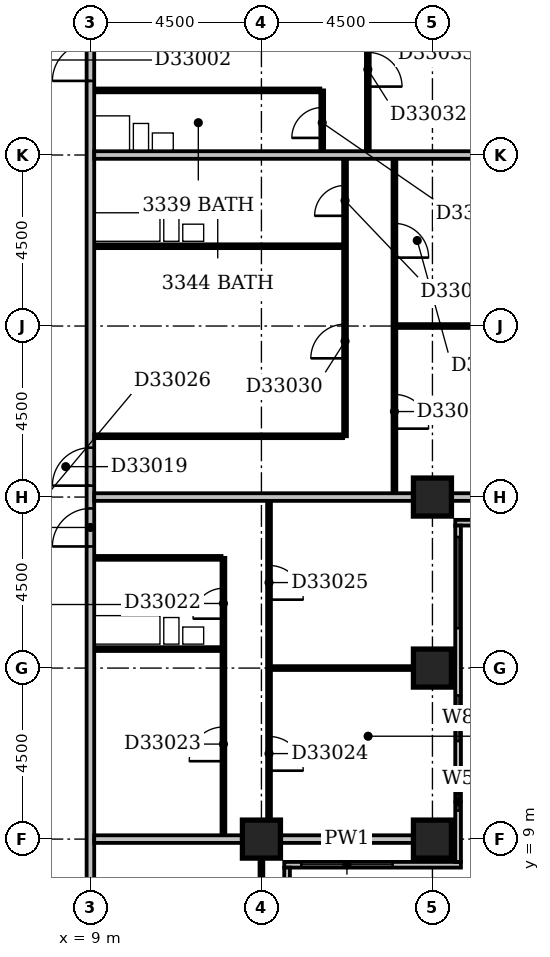
"""IFC4 building model, lengths in metres.
Left out: names, types, materials, properties, quantities, classifications, styles, units other than length and angle.
Written with IfcOpenShell. Run it as: python <this file> out.ifc"""

import sys

from ifc_helpers import new_model, si_unit, direction, frame, frame_2d, origin, origin_2d, place, context, subcontext, project, spatial, rectangle, extrude, element, fill, save


model = new_model("IFC4")
c1 = context("Model", 3, precision=1e-05, world=origin(), true_north=direction((0.0, 1.0)))
c2 = subcontext(c1, "Body", "Model", "MODEL_VIEW")
j1 = project(units=[si_unit("LENGTHUNIT", "METRE"), si_unit("PLANEANGLEUNIT", "RADIAN")], contexts=[c1])
p1 = place(None, origin())
s1 = spatial("IfcSite", under=j1, at=p1, CompositionType="ELEMENT")
p2 = place(p1, origin())
s2 = spatial("IfcBuilding", under=s1, at=p2, CompositionType="ELEMENT")
p3 = place(p2, frame((0.0, 0.0, 134.0)))
s3 = spatial("IfcBuildingStorey", under=s2, at=p3, CompositionType="ELEMENT", Elevation=134.0)
for number, where, z_axis, x_axis in (
    (1, (13.5, 9.0, -0.3), (0.0, 0.0, 1.0), (1.0, 0.0, 0.0)),
    (2, (18.0, 9.0, -0.3), (0.0, 0.0, 1.0), (1.0, 0.0, 0.0)),
    (3, (18.0, 13.5, -0.3), (0.0, 0.0, 1.0), (1.0, 0.0, 0.0)),
    (4, (18.0, 18.0, -0.3), (0.0, 0.0, 1.0), (1.0, 0.0, 0.0)),
):
    element("IfcColumn", number, at=place(p3, frame(where, z_axis=z_axis, x_axis=x_axis)), inside=s3, PredefinedType="COLUMN", context=c2, shape_type="SweptSolid", body=[
        extrude(rectangle(XDim=1.0, YDim=1.0, at=origin_2d()), origin(), (0.0, 0.0, 1.0), 3.6),
    ])
p4 = place(p3, frame((14.175, 3.9, 0.0), z_axis=(0.0, 0.0, 1.0), x_axis=(0.0, 1.0, 0.0)))
e5 = element("IfcWall", 5, at=p4, inside=s3, PredefinedType="STANDARD", context=c2, shape_type="SweptSolid", body=[
    extrude(rectangle(XDim=4.35, YDim=0.15, at=frame_2d((2.175, 0.0))), origin(), (0.0, 0.0, 1.0), 2.7),
])
p5 = place(p4, frame((1.65, 0.0, 0.6)))
e6 = element("IfcOpeningElement", 6, at=p5, cuts=e5, PredefinedType="OPENING", context=c2, shape_type="SweptSolid", body=[
    extrude(rectangle(XDim=2.4, YDim=1.8, at=frame_2d((1.2, 0.9))), frame((0.0, 0.087, 0.0), z_axis=(0.0, -1.0, 0.0), x_axis=(1.0, 0.0, 0.0)), (0.0, 0.0, 1.0), 0.174),
])
p6 = place(p3, frame((14.1, 8.325, 0.0), z_axis=(0.0, 0.0, 1.0), x_axis=(1.0, 0.0, 0.0)))
e7 = element("IfcWall", 7, at=p6, inside=s3, PredefinedType="STANDARD", context=c2, shape_type="SweptSolid", body=[
    extrude(rectangle(XDim=4.65, YDim=0.15, at=frame_2d((2.325, 0.0))), origin(), (0.0, 0.0, 1.0), 2.7),
])
p7 = place(p6, frame((0.45, 0.0, 0.6)))
e8 = element("IfcOpeningElement", 8, at=p7, cuts=e7, PredefinedType="OPENING", context=c2, shape_type="SweptSolid", body=[
    extrude(rectangle(XDim=2.4, YDim=1.8, at=frame_2d((1.2, 0.9))), frame((0.0, 0.087, 0.0), z_axis=(0.0, -1.0, 0.0), x_axis=(1.0, 0.0, 0.0)), (0.0, 0.0, 1.0), 0.174),
])
p8 = place(p3, frame((18.675, 8.4, 0.0), z_axis=(0.0, 0.0, 1.0), x_axis=(0.0, 1.0, 0.0)))
e9 = element("IfcWall", 9, at=p8, inside=s3, PredefinedType="STANDARD", context=c2, shape_type="SweptSolid", body=[
    extrude(rectangle(XDim=8.85, YDim=0.15, at=frame_2d((4.425, 0.0))), origin(), (0.0, 0.0, 1.0), 2.7),
])
p9 = place(p8, frame((1.351, 0.0, 0.6)))
e10 = element("IfcOpeningElement", 10, at=p9, cuts=e9, PredefinedType="OPENING", context=c2, shape_type="SweptSolid", body=[
    extrude(rectangle(XDim=0.45, YDim=1.8, at=frame_2d((0.225, 0.9))), frame((0.0, 0.087, 0.0), z_axis=(0.0, -1.0, 0.0), x_axis=(1.0, 0.0, 0.0)), (0.0, 0.0, 1.0), 0.174),
])
p10 = place(p8, frame((3.179, 0.0, 0.6)))
e11 = element("IfcOpeningElement", 11, at=p10, cuts=e9, PredefinedType="OPENING", context=c2, shape_type="SweptSolid", body=[
    extrude(rectangle(XDim=1.2, YDim=1.8, at=frame_2d((0.6, 0.9))), frame((0.0, 0.087, 0.0), z_axis=(0.0, -1.0, 0.0), x_axis=(1.0, 0.0, 0.0)), (0.0, 0.0, 1.0), 0.174),
])
p11 = place(p8, frame((6.15, 0.0, 0.6)))
e12 = element("IfcOpeningElement", 12, at=p11, cuts=e9, PredefinedType="OPENING", context=c2, shape_type="SweptSolid", body=[
    extrude(rectangle(XDim=2.4, YDim=1.8, at=frame_2d((1.2, 0.9))), frame((0.0, 0.087, 0.0), z_axis=(0.0, -1.0, 0.0), x_axis=(1.0, 0.0, 0.0)), (0.0, 0.0, 1.0), 0.174),
])
p12 = place(p3, frame((18.6, 17.325, 0.0), z_axis=(0.0, 0.0, 1.0), x_axis=(1.0, 0.0, 0.0)))
e13 = element("IfcWall", 13, at=p12, inside=s3, PredefinedType="STANDARD", context=c2, shape_type="SweptSolid", body=[
    extrude(rectangle(XDim=4.65, YDim=0.15, at=frame_2d((2.325, 0.0))), origin(), (0.0, 0.0, 1.0), 2.7),
])
p13 = place(p12, frame((0.45, 0.0, 0.6)))
e14 = element("IfcOpeningElement", 14, at=p13, cuts=e13, PredefinedType="OPENING", context=c2, shape_type="SweptSolid", body=[
    extrude(rectangle(XDim=2.4, YDim=1.8, at=frame_2d((1.2, 0.9))), frame((0.0, 0.087, 0.0), z_axis=(0.0, -1.0, 0.0), x_axis=(1.0, 0.0, 0.0)), (0.0, 0.0, 1.0), 0.174),
])
p14 = place(p3, frame((9.0, 5.0, 0.0), z_axis=(0.0, 0.0, 1.0), x_axis=(0.0, 1.0, 0.0)))
e15 = element("IfcWall", 15, at=p14, inside=s3, PredefinedType="PARTITIONING", context=c2, shape_type="SweptSolid", body=[
    extrude(rectangle(XDim=27.75, YDim=0.2, at=frame_2d((13.875, 0.0))), origin(), (0.0, 0.0, 1.0), 3.3),
])
p15 = place(p14, frame((23.95, 0.0, 0.0)))
e16 = element("IfcOpeningElement", 16, at=p15, cuts=e15, PredefinedType="OPENING", context=c2, shape_type="SweptSolid", body=[
    extrude(rectangle(XDim=1.0, YDim=2.1, at=frame_2d((0.5, 1.05))), frame((0.0, 0.112, 0.0), z_axis=(0.0, -1.0, 0.0), x_axis=(1.0, 0.0, 0.0)), (0.0, 0.0, 1.0), 0.224),
])
p16 = place(p14, frame((13.3, 0.0, 0.0)))
e17 = element("IfcOpeningElement", 17, at=p16, cuts=e15, PredefinedType="OPENING", context=c2, shape_type="SweptSolid", body=[
    extrude(rectangle(XDim=1.0, YDim=2.1, at=frame_2d((0.5, 1.05))), frame((0.0, 0.112, 0.0), z_axis=(0.0, -1.0, 0.0), x_axis=(1.0, 0.0, 0.0)), (0.0, 0.0, 1.0), 0.224),
])
p17 = place(p14, frame((11.7, 0.0, 0.0)))
e18 = element("IfcOpeningElement", 18, at=p17, cuts=e15, PredefinedType="OPENING", context=c2, shape_type="SweptSolid", body=[
    extrude(rectangle(XDim=1.0, YDim=2.1, at=frame_2d((0.5, 1.05))), frame((0.0, 0.112, 0.0), z_axis=(0.0, -1.0, 0.0), x_axis=(1.0, 0.0, 0.0)), (0.0, 0.0, 1.0), 0.224),
])
p18 = place(p14, frame((1.5, 0.0, 0.0)))
e19 = element("IfcOpeningElement", 19, at=p18, cuts=e15, PredefinedType="OPENING", context=c2, shape_type="SweptSolid", body=[
    extrude(rectangle(XDim=0.9, YDim=2.1, at=frame_2d((0.45, 1.05))), frame((0.0, 0.112, 0.0), z_axis=(0.0, -1.0, 0.0), x_axis=(1.0, 0.0, 0.0)), (0.0, 0.0, 1.0), 0.224),
])
p19 = place(p3, frame((13.5, 5.0, 0.0), z_axis=(0.0, 0.0, 1.0), x_axis=(0.0, 1.0, 0.0)))
e20 = element("IfcWall", 20, at=p19, inside=s3, PredefinedType="PARTITIONING", context=c2, shape_type="SweptSolid", body=[
    extrude(rectangle(XDim=3.5, YDim=0.1, at=frame_2d((1.75, 0.0))), origin(), (0.0, 0.0, 1.0), 2.7),
])
p20 = place(p3, frame((9.1, 9.0, 0.0), z_axis=(0.0, 0.0, 1.0), x_axis=(1.0, 0.0, 0.0)))
e21 = element("IfcWall", 21, at=p20, inside=s3, PredefinedType="PARTITIONING", context=c2, shape_type="SweptSolid", body=[
    extrude(rectangle(XDim=3.9, YDim=0.2, at=frame_2d((1.95, 0.0))), origin(), (0.0, 0.0, 1.0), 3.3),
])
p21 = place(p3, frame((14.0, 9.0, 0.0), z_axis=(0.0, 0.0, 1.0), x_axis=(1.0, 0.0, 0.0)))
e22 = element("IfcWall", 22, at=p21, inside=s3, PredefinedType="PARTITIONING", context=c2, shape_type="SweptSolid", body=[
    extrude(rectangle(XDim=3.5, YDim=0.2, at=frame_2d((1.75, 0.0))), origin(), (0.0, 0.0, 1.0), 2.7),
])
p22 = place(p3, frame((12.5, 9.1, 0.0), z_axis=(0.0, 0.0, 1.0), x_axis=(0.0, 1.0, 0.0)))
e23 = element("IfcWall", 23, at=p22, inside=s3, PredefinedType="PARTITIONING", context=c2, shape_type="SweptSolid", body=[
    extrude(rectangle(XDim=7.3, YDim=0.1, at=frame_2d((3.65, 0.0))), origin(), (0.0, 0.0, 1.0), 3.3),
])
p23 = place(p22, frame((5.7, 0.0, 0.0)))
e24 = element("IfcOpeningElement", 24, at=p23, cuts=e23, PredefinedType="OPENING", context=c2, shape_type="SweptSolid", body=[
    extrude(rectangle(XDim=0.8, YDim=2.1, at=frame_2d((0.4, 1.05))), frame((0.0, 0.062, 0.0), z_axis=(0.0, -1.0, 0.0), x_axis=(1.0, 0.0, 0.0)), (0.0, 0.0, 1.0), 0.124),
])
p24 = place(p22, frame((1.95, 0.0, 0.0)))
e25 = element("IfcOpeningElement", 25, at=p24, cuts=e23, PredefinedType="OPENING", context=c2, shape_type="SweptSolid", body=[
    extrude(rectangle(XDim=0.9, YDim=2.1, at=frame_2d((0.45, 1.05))), frame((0.0, 0.062, 0.0), z_axis=(0.0, -1.0, 0.0), x_axis=(1.0, 0.0, 0.0)), (0.0, 0.0, 1.0), 0.124),
])
p25 = place(p3, frame((13.7, 9.5, 0.0), z_axis=(0.0, 0.0, 1.0), x_axis=(0.0, 1.0, 0.0)))
e26 = element("IfcWall", 26, at=p25, inside=s3, PredefinedType="PARTITIONING", context=c2, shape_type="SweptSolid", body=[
    extrude(rectangle(XDim=8.4, YDim=0.1, at=frame_2d((4.2, 0.0))), origin(), (0.0, 0.0, 1.0), 3.3),
])
p26 = place(p25, frame((1.3, 0.0, 0.0)))
e27 = element("IfcOpeningElement", 27, at=p26, cuts=e26, PredefinedType="OPENING", context=c2, shape_type="SweptSolid", body=[
    extrude(rectangle(XDim=0.9, YDim=2.1, at=frame_2d((0.45, 1.05))), frame((0.0, 0.062, 0.0), z_axis=(0.0, -1.0, 0.0), x_axis=(1.0, 0.0, 0.0)), (0.0, 0.0, 1.0), 0.124),
])
p27 = place(p25, frame((5.8, 0.0, 0.0)))
e28 = element("IfcOpeningElement", 28, at=p27, cuts=e26, PredefinedType="OPENING", context=c2, shape_type="SweptSolid", body=[
    extrude(rectangle(XDim=0.9, YDim=2.1, at=frame_2d((0.45, 1.05))), frame((0.0, 0.062, 0.0), z_axis=(0.0, -1.0, 0.0), x_axis=(1.0, 0.0, 0.0)), (0.0, 0.0, 1.0), 0.124),
])
p28 = place(p3, frame((13.75, 13.5, 0.0), z_axis=(0.0, 0.0, 1.0), x_axis=(1.0, 0.0, 0.0)))
e29 = element("IfcWall", 29, at=p28, inside=s3, PredefinedType="PARTITIONING", context=c2, shape_type="SweptSolid", body=[
    extrude(rectangle(XDim=3.75, YDim=0.1, at=frame_2d((1.875, 0.0))), origin(), (0.0, 0.0, 1.0), 3.3),
])
for number, where, z_axis, x_axis in (
    (30, (9.1, 14.0, 0.0), (0.0, 0.0, 1.0), (1.0, 0.0, 0.0)),
    (31, (9.1, 16.4, 0.0), (0.0, 0.0, 1.0), (1.0, 0.0, 0.0)),
):
    element("IfcWall", number, at=place(p3, frame(where, z_axis=z_axis, x_axis=x_axis)), inside=s3, PredefinedType="PLUMBINGWALL", context=c2, shape_type="SweptSolid", body=[
        extrude(rectangle(XDim=3.35, YDim=0.1, at=frame_2d((1.675, 0.0))), origin(), (0.0, 0.0, 1.0), 3.3),
    ])
p29 = place(p3, frame((9.1, 18.0, 0.0), z_axis=(0.0, 0.0, 1.0), x_axis=(1.0, 0.0, 0.0)))
e32 = element("IfcWall", 32, at=p29, inside=s3, PredefinedType="PARTITIONING", context=c2, shape_type="SweptSolid", body=[
    extrude(rectangle(XDim=8.4, YDim=0.2, at=frame_2d((4.2, 0.0))), origin(), (0.0, 0.0, 1.0), 2.6),
])
p30 = place(p3, frame((18.5, 18.0, 0.0), z_axis=(0.0, 0.0, 1.0), x_axis=(1.0, 0.0, 0.0)))
e33 = element("IfcWall", 33, at=p30, inside=s3, PredefinedType="PARTITIONING", context=c2, shape_type="SweptSolid", body=[
    extrude(rectangle(XDim=3.5, YDim=0.2, at=frame_2d((1.75, 0.0))), origin(), (0.0, 0.0, 1.0), 2.7),
])
p31 = place(p3, frame((17.0, 18.1, 0.0), z_axis=(0.0, 0.0, 1.0), x_axis=(0.0, 1.0, 0.0)))
e34 = element("IfcWall", 34, at=p31, inside=s3, PredefinedType="PARTITIONING", context=c2, shape_type="SweptSolid", body=[
    extrude(rectangle(XDim=8.8, YDim=0.1, at=frame_2d((4.4, 0.0))), origin(), (0.0, 0.0, 1.0), 3.3),
])
p32 = place(p31, frame((1.7, 0.0, 0.0)))
e35 = element("IfcOpeningElement", 35, at=p32, cuts=e34, PredefinedType="OPENING", context=c2, shape_type="SweptSolid", body=[
    extrude(rectangle(XDim=0.9, YDim=2.1, at=frame_2d((0.45, 1.05))), frame((0.0, 0.062, 0.0), z_axis=(0.0, -1.0, 0.0), x_axis=(1.0, 0.0, 0.0)), (0.0, 0.0, 1.0), 0.124),
])
p33 = place(p31, frame((6.2, 0.0, 0.0)))
e36 = element("IfcOpeningElement", 36, at=p33, cuts=e34, PredefinedType="OPENING", context=c2, shape_type="SweptSolid", body=[
    extrude(rectangle(XDim=0.9, YDim=2.1, at=frame_2d((0.45, 1.05))), frame((0.0, 0.062, 0.0), z_axis=(0.0, -1.0, 0.0), x_axis=(1.0, 0.0, 0.0)), (0.0, 0.0, 1.0), 0.124),
])
p34 = place(p3, frame((9.1, 19.6, 0.0), z_axis=(0.0, 0.0, 1.0), x_axis=(1.0, 0.0, 0.0)))
e37 = element("IfcWall", 37, at=p34, inside=s3, PredefinedType="PARTITIONING", context=c2, shape_type="SweptSolid", body=[
    extrude(rectangle(XDim=6.55, YDim=0.1, at=frame_2d((3.275, 0.0))), origin(), (0.0, 0.0, 1.0), 3.3),
])
p35 = place(p3, frame((15.7, 19.6, 0.0), z_axis=(0.0, 0.0, 1.0), x_axis=(0.0, 1.0, 0.0)))
e38 = element("IfcWall", 38, at=p35, inside=s3, PredefinedType="PARTITIONING", context=c2, shape_type="SweptSolid", body=[
    extrude(rectangle(XDim=7.3, YDim=0.1, at=frame_2d((3.65, 0.0))), origin(), (0.0, 0.0, 1.0), 3.3),
])
p36 = place(p35, frame((5.8, 0.0, 0.0)))
e39 = element("IfcOpeningElement", 39, at=p36, cuts=e38, PredefinedType="OPENING", context=c2, shape_type="SweptSolid", body=[
    extrude(rectangle(XDim=0.8, YDim=2.1, at=frame_2d((0.4, 1.05))), frame((0.0, 0.062, 0.0), z_axis=(0.0, -1.0, 0.0), x_axis=(1.0, 0.0, 0.0)), (0.0, 0.0, 1.0), 0.124),
])
p37 = place(p35, frame((2.05, 0.0, 0.0)))
e40 = element("IfcOpeningElement", 40, at=p37, cuts=e38, PredefinedType="OPENING", context=c2, shape_type="SweptSolid", body=[
    extrude(rectangle(XDim=0.9, YDim=2.1, at=frame_2d((0.45, 1.05))), frame((0.0, 0.062, 0.0), z_axis=(0.0, -1.0, 0.0), x_axis=(1.0, 0.0, 0.0)), (0.0, 0.0, 1.0), 0.124),
])
p38 = place(p3, frame((17.05, 22.5, 0.0), z_axis=(0.0, 0.0, 1.0), x_axis=(1.0, 0.0, 0.0)))
e41 = element("IfcWall", 41, at=p38, inside=s3, PredefinedType="PARTITIONING", context=c2, shape_type="SweptSolid", body=[
    extrude(rectangle(XDim=4.95, YDim=0.1, at=frame_2d((2.475, 0.0))), origin(), (0.0, 0.0, 1.0), 3.3),
])
p39 = place(p3, frame((9.1, 24.6, 0.0), z_axis=(0.0, 0.0, 1.0), x_axis=(1.0, 0.0, 0.0)))
e42 = element("IfcWall", 42, at=p39, inside=s3, PredefinedType="PLUMBINGWALL", context=c2, shape_type="SweptSolid", body=[
    extrude(rectangle(XDim=6.55, YDim=0.1, at=frame_2d((3.275, 0.0))), origin(), (0.0, 0.0, 1.0), 3.3),
])
p40 = place(p3, frame((9.1, 27.0, 0.0), z_axis=(0.0, 0.0, 1.0), x_axis=(1.0, 0.0, 0.0)))
e43 = element("IfcWall", 43, at=p40, inside=s3, PredefinedType="PARTITIONING", context=c2, shape_type="SweptSolid", body=[
    extrude(rectangle(XDim=12.9, YDim=0.2, at=frame_2d((6.45, 0.0))), origin(), (0.0, 0.0, 1.0), 2.7),
])
p41 = place(p3, frame((15.1, 27.1, 0.0), z_axis=(0.0, 0.0, 1.0), x_axis=(0.0, 1.0, 0.0)))
e44 = element("IfcWall", 44, at=p41, inside=s3, PredefinedType="PARTITIONING", context=c2, shape_type="SweptSolid", body=[
    extrude(rectangle(XDim=1.6, YDim=0.1, at=frame_2d((0.8, 0.0))), origin(), (0.0, 0.0, 1.0), 3.3),
])
p42 = place(p41, frame((0.35, 0.0, 0.0)))
e45 = element("IfcOpeningElement", 45, at=p42, cuts=e44, PredefinedType="OPENING", context=c2, shape_type="SweptSolid", body=[
    extrude(rectangle(XDim=0.8, YDim=2.1, at=frame_2d((0.4, 1.05))), frame((0.0, 0.062, 0.0), z_axis=(0.0, -1.0, 0.0), x_axis=(1.0, 0.0, 0.0)), (0.0, 0.0, 1.0), 0.124),
])
p43 = place(p3, frame((16.3, 27.1, 0.0), z_axis=(0.0, 0.0, 1.0), x_axis=(0.0, 1.0, 0.0)))
e46 = element("IfcWall", 46, at=p43, inside=s3, PredefinedType="PARTITIONING", context=c2, shape_type="SweptSolid", body=[
    extrude(rectangle(XDim=4.3, YDim=0.1, at=frame_2d((2.15, 0.0))), origin(), (0.0, 0.0, 1.0), 3.3),
])
p44 = place(p43, frame((1.7, 0.0, 0.0)))
e47 = element("IfcOpeningElement", 47, at=p44, cuts=e46, PredefinedType="OPENING", context=c2, shape_type="SweptSolid", body=[
    extrude(rectangle(XDim=0.9, YDim=2.1, at=frame_2d((0.45, 1.05))), frame((0.0, 0.062, 0.0), z_axis=(0.0, -1.0, 0.0), x_axis=(1.0, 0.0, 0.0)), (0.0, 0.0, 1.0), 0.124),
])
p45 = place(p3, frame((9.1, 28.7, 0.0), z_axis=(0.0, 0.0, 1.0), x_axis=(1.0, 0.0, 0.0)))
e48 = element("IfcWall", 48, at=p45, inside=s3, PredefinedType="PLUMBINGWALL", context=c2, shape_type="SweptSolid", body=[
    extrude(rectangle(XDim=5.95, YDim=0.1, at=frame_2d((2.975, 0.0))), origin(), (0.0, 0.0, 1.0), 3.3),
])
p46 = place(p7, origin())
e49 = element("IfcWindow", 49, at=p46, inside=s3, PartitioningType="SINGLE_PANEL", PredefinedType="WINDOW", context=c2, shape_type="SweptSolid", body=[
    extrude(rectangle(XDim=2.4, YDim=1.8, at=frame_2d((1.2, 0.9))), frame((0.0, 0.03, 0.0), z_axis=(0.0, -1.0, 0.0), x_axis=(1.0, 0.0, 0.0)), (0.0, 0.0, 1.0), 0.06),
])
fill(e8, e49)
p47 = place(p9, origin())
e50 = element("IfcWindow", 50, at=p47, inside=s3, PartitioningType="SINGLE_PANEL", PredefinedType="WINDOW", context=c2, shape_type="SweptSolid", body=[
    extrude(rectangle(XDim=0.45, YDim=1.8, at=frame_2d((0.225, 0.9))), frame((0.0, 0.03, 0.0), z_axis=(0.0, -1.0, 0.0), x_axis=(1.0, 0.0, 0.0)), (0.0, 0.0, 1.0), 0.06),
])
fill(e10, e50)
p48 = place(p10, origin())
e51 = element("IfcWindow", 51, at=p48, inside=s3, PartitioningType="SINGLE_PANEL", PredefinedType="WINDOW", context=c2, shape_type="SweptSolid", body=[
    extrude(rectangle(XDim=1.2, YDim=1.8, at=frame_2d((0.6, 0.9))), frame((0.0, 0.03, 0.0), z_axis=(0.0, -1.0, 0.0), x_axis=(1.0, 0.0, 0.0)), (0.0, 0.0, 1.0), 0.06),
])
fill(e11, e51)
p49 = place(p11, origin())
e52 = element("IfcWindow", 52, at=p49, inside=s3, PartitioningType="SINGLE_PANEL", PredefinedType="WINDOW", context=c2, shape_type="SweptSolid", body=[
    extrude(rectangle(XDim=2.4, YDim=1.8, at=frame_2d((1.2, 0.9))), frame((0.0, 0.03, 0.0), z_axis=(0.0, -1.0, 0.0), x_axis=(1.0, 0.0, 0.0)), (0.0, 0.0, 1.0), 0.06),
])
fill(e12, e52)
p50 = place(p15, origin())
e53 = element("IfcDoor", 53, at=p50, inside=s3, OperationType="SINGLE_SWING_LEFT", PredefinedType="DOOR", context=c2, shape_type="SweptSolid", body=[
    extrude(rectangle(XDim=1.0, YDim=2.1, at=frame_2d((0.5, 1.05))), frame((0.0, 0.025, 0.0), z_axis=(0.0, -1.0, 0.0), x_axis=(1.0, 0.0, 0.0)), (0.0, 0.0, 1.0), 0.05),
])
fill(e16, e53)
p51 = place(p16, origin())
e54 = element("IfcDoor", 54, at=p51, inside=s3, OperationType="SINGLE_SWING_LEFT", PredefinedType="DOOR", context=c2, shape_type="SweptSolid", body=[
    extrude(rectangle(XDim=1.0, YDim=2.1, at=frame_2d((0.5, 1.05))), frame((0.0, 0.025, 0.0), z_axis=(0.0, -1.0, 0.0), x_axis=(1.0, 0.0, 0.0)), (0.0, 0.0, 1.0), 0.05),
])
fill(e17, e54)
p52 = place(p17, origin())
e55 = element("IfcDoor", 55, at=p52, inside=s3, OperationType="SINGLE_SWING_LEFT", PredefinedType="DOOR", context=c2, shape_type="SweptSolid", body=[
    extrude(rectangle(XDim=1.0, YDim=2.1, at=frame_2d((0.5, 1.05))), frame((0.0, 0.025, 0.0), z_axis=(0.0, -1.0, 0.0), x_axis=(1.0, 0.0, 0.0)), (0.0, 0.0, 1.0), 0.05),
])
fill(e18, e55)
p53 = place(p23, origin())
e56 = element("IfcDoor", 56, at=p53, inside=s3, OperationType="SINGLE_SWING_LEFT", PredefinedType="DOOR", context=c2, shape_type="SweptSolid", body=[
    extrude(rectangle(XDim=0.8, YDim=2.1, at=frame_2d((0.4, 1.05))), frame((0.0, 0.025, 0.0), z_axis=(0.0, -1.0, 0.0), x_axis=(1.0, 0.0, 0.0)), (0.0, 0.0, 1.0), 0.05),
])
fill(e24, e56)
p54 = place(p24, origin())
e57 = element("IfcDoor", 57, at=p54, inside=s3, OperationType="SINGLE_SWING_LEFT", PredefinedType="DOOR", context=c2, shape_type="SweptSolid", body=[
    extrude(rectangle(XDim=0.9, YDim=2.1, at=frame_2d((0.45, 1.05))), frame((0.0, 0.025, 0.0), z_axis=(0.0, -1.0, 0.0), x_axis=(1.0, 0.0, 0.0)), (0.0, 0.0, 1.0), 0.05),
])
fill(e25, e57)
p55 = place(p26, frame((0.9, 0.0, 0.0), z_axis=(0.0, 0.0, 1.0), x_axis=(-1.0, 0.0, 0.0)))
e58 = element("IfcDoor", 58, at=p55, inside=s3, OperationType="SINGLE_SWING_RIGHT", PredefinedType="DOOR", context=c2, shape_type="SweptSolid", body=[
    extrude(rectangle(XDim=0.9, YDim=2.1, at=frame_2d((0.45, 1.05))), frame((0.0, 0.025, 0.0), z_axis=(0.0, -1.0, 0.0), x_axis=(1.0, 0.0, 0.0)), (0.0, 0.0, 1.0), 0.05),
])
fill(e27, e58)
p56 = place(p27, frame((0.9, 0.0, 0.0), z_axis=(0.0, 0.0, 1.0), x_axis=(-1.0, 0.0, 0.0)))
e59 = element("IfcDoor", 59, at=p56, inside=s3, OperationType="SINGLE_SWING_RIGHT", PredefinedType="DOOR", context=c2, shape_type="SweptSolid", body=[
    extrude(rectangle(XDim=0.9, YDim=2.1, at=frame_2d((0.45, 1.05))), frame((0.0, 0.025, 0.0), z_axis=(0.0, -1.0, 0.0), x_axis=(1.0, 0.0, 0.0)), (0.0, 0.0, 1.0), 0.05),
])
fill(e28, e59)
p57 = place(p32, frame((0.9, 0.0, 0.0), z_axis=(0.0, 0.0, 1.0), x_axis=(-1.0, 0.0, 0.0)))
e60 = element("IfcDoor", 60, at=p57, inside=s3, OperationType="SINGLE_SWING_RIGHT", PredefinedType="DOOR", context=c2, shape_type="SweptSolid", body=[
    extrude(rectangle(XDim=0.9, YDim=2.1, at=frame_2d((0.45, 1.05))), frame((0.0, 0.025, 0.0), z_axis=(0.0, -1.0, 0.0), x_axis=(1.0, 0.0, 0.0)), (0.0, 0.0, 1.0), 0.05),
])
fill(e35, e60)
p58 = place(p33, frame((0.9, 0.0, 0.0), z_axis=(0.0, 0.0, 1.0), x_axis=(-1.0, 0.0, 0.0)))
e61 = element("IfcDoor", 61, at=p58, inside=s3, OperationType="SINGLE_SWING_RIGHT", PredefinedType="DOOR", context=c2, shape_type="SweptSolid", body=[
    extrude(rectangle(XDim=0.9, YDim=2.1, at=frame_2d((0.45, 1.05))), frame((0.0, 0.025, 0.0), z_axis=(0.0, -1.0, 0.0), x_axis=(1.0, 0.0, 0.0)), (0.0, 0.0, 1.0), 0.05),
])
fill(e36, e61)
p59 = place(p36, origin())
e62 = element("IfcDoor", 62, at=p59, inside=s3, OperationType="SINGLE_SWING_LEFT", PredefinedType="DOOR", context=c2, shape_type="SweptSolid", body=[
    extrude(rectangle(XDim=0.8, YDim=2.1, at=frame_2d((0.4, 1.05))), frame((0.0, 0.025, 0.0), z_axis=(0.0, -1.0, 0.0), x_axis=(1.0, 0.0, 0.0)), (0.0, 0.0, 1.0), 0.05),
])
fill(e39, e62)
p60 = place(p37, origin())
e63 = element("IfcDoor", 63, at=p60, inside=s3, OperationType="SINGLE_SWING_LEFT", PredefinedType="DOOR", context=c2, shape_type="SweptSolid", body=[
    extrude(rectangle(XDim=0.9, YDim=2.1, at=frame_2d((0.45, 1.05))), frame((0.0, 0.025, 0.0), z_axis=(0.0, -1.0, 0.0), x_axis=(1.0, 0.0, 0.0)), (0.0, 0.0, 1.0), 0.05),
])
fill(e40, e63)
p61 = place(p42, origin())
e64 = element("IfcDoor", 64, at=p61, inside=s3, OperationType="SINGLE_SWING_LEFT", PredefinedType="DOOR", context=c2, shape_type="SweptSolid", body=[
    extrude(rectangle(XDim=0.8, YDim=2.1, at=frame_2d((0.4, 1.05))), frame((0.0, 0.025, 0.0), z_axis=(0.0, -1.0, 0.0), x_axis=(1.0, 0.0, 0.0)), (0.0, 0.0, 1.0), 0.05),
])
fill(e45, e64)
p62 = place(p44, frame((0.9, 0.0, 0.0), z_axis=(0.0, 0.0, 1.0), x_axis=(-1.0, 0.0, 0.0)))
e65 = element("IfcDoor", 65, at=p62, inside=s3, OperationType="SINGLE_SWING_RIGHT", PredefinedType="DOOR", context=c2, shape_type="SweptSolid", body=[
    extrude(rectangle(XDim=0.9, YDim=2.1, at=frame_2d((0.45, 1.05))), frame((0.0, 0.025, 0.0), z_axis=(0.0, -1.0, 0.0), x_axis=(1.0, 0.0, 0.0)), (0.0, 0.0, 1.0), 0.05),
])
fill(e47, e65)
save(model, sys.argv[1])
